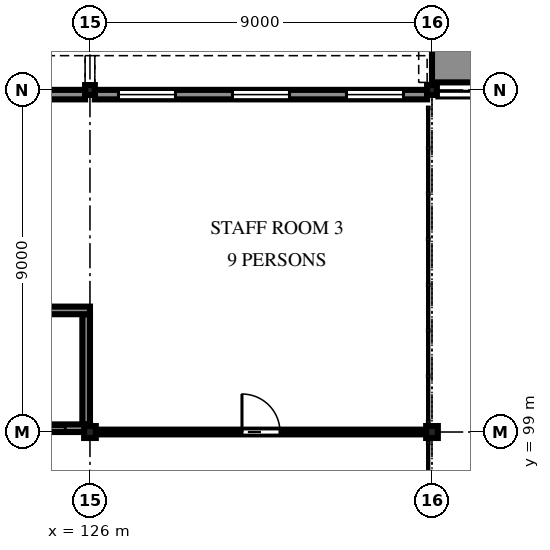
"""IFC4 building model, lengths in metres.
Left out: names, types, materials, properties, quantities, classifications, styles, units other than length and angle.
Written with IfcOpenShell. Run it as: python <this file> out.ifc"""

import sys

from ifc_helpers import new_model, si_unit, direction, frame, frame_2d, origin, origin_2d, place, context, subcontext, project, spatial, polyline, rectangle, i_section, outline, extrude, element, fill, save


model = new_model("IFC4")
c1 = context("Model", 3, precision=1e-05, world=origin(), true_north=direction((0.0, 1.0)))
c2 = subcontext(c1, "Body", "Model", "MODEL_VIEW")
j1 = project(units=[si_unit("LENGTHUNIT", "METRE"), si_unit("PLANEANGLEUNIT", "RADIAN")], contexts=[c1])
p1 = place(None, origin())
s1 = spatial("IfcSite", under=j1, at=p1, CompositionType="ELEMENT")
p2 = place(p1, origin())
s2 = spatial("IfcBuilding", under=s1, at=p2, CompositionType="ELEMENT")
p3 = place(p2, frame((0.0, 0.0, 7.5)))
s3 = spatial("IfcBuildingStorey", under=s2, at=p3, CompositionType="ELEMENT", Elevation=7.5)
p4 = place(p3, frame((126.0, 99.0, 0.0), z_axis=(0.0, 0.0, 1.0), x_axis=(1.0, 0.0, 0.0)))
e1 = element("IfcColumn", 1, at=p4, inside=s3, PredefinedType="COLUMN", context=c2, shape_type="SweptSolid", body=[
    extrude(i_section(OverallWidth=0.307, OverallDepth=0.314, WebThickness=0.012, FlangeThickness=0.019, FilletRadius=0.015, at=origin_2d()), origin(), (0.0, 0.0, 1.0), 4.2),
])
p5 = place(p3, frame((126.0, 108.0, 0.0), z_axis=(0.0, 0.0, 1.0), x_axis=(1.0, 0.0, 0.0)))
e2 = element("IfcColumn", 2, at=p5, inside=s3, PredefinedType="COLUMN", context=c2, shape_type="SweptSolid", body=[
    extrude(i_section(OverallWidth=0.256, OverallDepth=0.26, WebThickness=0.01, FlangeThickness=0.017, FilletRadius=0.013, at=origin_2d()), origin(), (0.0, 0.0, 1.0), 4.2),
])
p6 = place(p3, frame((135.0, 99.0, 0.0), z_axis=(0.0, 0.0, 1.0), x_axis=(1.0, 0.0, 0.0)))
e3 = element("IfcColumn", 3, at=p6, inside=s3, PredefinedType="COLUMN", context=c2, shape_type="SweptSolid", body=[
    extrude(i_section(OverallWidth=0.307, OverallDepth=0.314, WebThickness=0.012, FlangeThickness=0.019, FilletRadius=0.015, at=origin_2d()), origin(), (0.0, 0.0, 1.0), 4.2),
])
p7 = place(p3, frame((135.0, 108.0, 0.0), z_axis=(0.0, 0.0, 1.0), x_axis=(1.0, 0.0, 0.0)))
e4 = element("IfcColumn", 4, at=p7, inside=s3, PredefinedType="COLUMN", context=c2, shape_type="SweptSolid", body=[
    extrude(i_section(OverallWidth=0.256, OverallDepth=0.26, WebThickness=0.01, FlangeThickness=0.017, FilletRadius=0.013, at=origin_2d()), origin(), (0.0, 0.0, 1.0), 4.2),
])
p8 = place(p3, frame((117.128, 107.878, 0.0), z_axis=(0.0, 0.0, 1.0), x_axis=(1.0, 0.0, 0.0)))
e5 = element("IfcWall", 5, at=p8, inside=s3, PredefinedType="SOLIDWALL", context=c2, shape_type="SweptSolid", body=[
    extrude(rectangle(XDim=8.744, YDim=0.25, at=frame_2d((4.372, 0.0))), origin(), (0.0, 0.0, 1.0), 4.05),
])
p9 = place(p8, frame((3.922, 0.0, 1.2)))
e6 = element("IfcOpeningElement", 6, at=p9, cuts=e5, PredefinedType="OPENING", context=c2, shape_type="SweptSolid", body=[
    extrude(rectangle(XDim=0.9, YDim=1.8, at=frame_2d((0.45, 0.9))), frame((0.0, 0.135, 0.0), z_axis=(0.0, -1.0, 0.0), x_axis=(1.0, 0.0, 0.0)), (0.0, 0.0, 1.0), 0.27),
])
p10 = place(p3, frame((126.128, 107.878, 0.0), z_axis=(0.0, 0.0, 1.0), x_axis=(1.0, 0.0, 0.0)))
e7 = element("IfcWall", 7, at=p10, inside=s3, PredefinedType="SOLIDWALL", context=c2, shape_type="SweptSolid", body=[
    extrude(rectangle(XDim=8.744, YDim=0.25, at=frame_2d((4.372, 0.0))), origin(), (0.0, 0.0, 1.0), 4.05),
])
p11 = place(p10, frame((0.622, 0.0, 0.9)))
e8 = element("IfcOpeningElement", 8, at=p11, cuts=e7, PredefinedType="OPENING", context=c2, shape_type="SweptSolid", body=[
    extrude(rectangle(XDim=1.5, YDim=2.4, at=frame_2d((0.75, 1.2))), frame((0.0, 0.135, 0.0), z_axis=(0.0, -1.0, 0.0), x_axis=(1.0, 0.0, 0.0)), (0.0, 0.0, 1.0), 0.27),
])
p12 = place(p10, frame((3.622, 0.0, 0.9)))
e9 = element("IfcOpeningElement", 9, at=p12, cuts=e7, PredefinedType="OPENING", context=c2, shape_type="SweptSolid", body=[
    extrude(rectangle(XDim=1.5, YDim=2.4, at=frame_2d((0.75, 1.2))), frame((0.0, 0.135, 0.0), z_axis=(0.0, -1.0, 0.0), x_axis=(1.0, 0.0, 0.0)), (0.0, 0.0, 1.0), 0.27),
])
p13 = place(p10, frame((6.622, 0.0, 0.9)))
e10 = element("IfcOpeningElement", 10, at=p13, cuts=e7, PredefinedType="OPENING", context=c2, shape_type="SweptSolid", body=[
    extrude(rectangle(XDim=1.5, YDim=2.4, at=frame_2d((0.75, 1.2))), frame((0.0, 0.135, 0.0), z_axis=(0.0, -1.0, 0.0), x_axis=(1.0, 0.0, 0.0)), (0.0, 0.0, 1.0), 0.27),
])
p14 = place(p2, origin())
s4 = spatial("IfcBuildingStorey", under=s2, at=p14, CompositionType="ELEMENT", Elevation=0.0)
p15 = place(p14, frame((135.0, 108.7, -2.1), z_axis=(0.0, 0.0, 1.0), x_axis=(1.0, 0.0, 0.0)))
e11 = element("IfcWall", 11, at=p15, inside=s4, PredefinedType="SOLIDWALL", context=c2, shape_type="SweptSolid", body=[
    extrude(rectangle(XDim=3.0, YDim=1.0, at=frame_2d((1.5, 0.0))), origin(), (0.0, 0.0, 1.0), 26.1),
])
p16 = place(p3, frame((123.602, 99.1, 0.0), z_axis=(0.0, 0.0, 1.0), x_axis=(1.0, 0.0, 0.0)))
e12 = element("IfcWall", 12, at=p16, inside=s3, PredefinedType="SOLIDWALL", context=c2, shape_type="SweptSolid", body=[
    extrude(rectangle(XDim=2.398, YDim=0.2, at=frame_2d((1.199, 0.0))), origin(), (0.0, 0.0, 1.0), 3.516),
])
p17 = place(p16, frame((0.648, 0.0, 0.0)))
e13 = element("IfcOpeningElement", 13, at=p17, cuts=e12, PredefinedType="OPENING", context=c2, shape_type="SweptSolid", body=[
    extrude(rectangle(XDim=1.1, YDim=2.1, at=frame_2d((0.55, 1.05))), frame((0.0, 0.11, 0.0), z_axis=(0.0, -1.0, 0.0), x_axis=(1.0, 0.0, 0.0)), (0.0, 0.0, 1.0), 0.22),
])
p18 = place(p3, frame((123.602, 102.2, 0.0), z_axis=(0.0, 0.0, 1.0), x_axis=(1.0, 0.0, 0.0)))
e14 = element("IfcWall", 14, at=p18, inside=s3, PredefinedType="SOLIDWALL", context=c2, shape_type="SweptSolid", body=[
    extrude(rectangle(XDim=2.398, YDim=0.2, at=frame_2d((1.199, 0.0))), origin(), (0.0, 0.0, 1.0), 3.516),
])
p19 = place(p3, frame((125.9, 99.2, 0.0), z_axis=(0.0, 0.0, 1.0), x_axis=(0.0, 1.0, 0.0)))
e15 = element("IfcWall", 15, at=p19, inside=s3, PredefinedType="SOLIDWALL", context=c2, shape_type="SweptSolid", body=[
    extrude(rectangle(XDim=2.9, YDim=0.2, at=frame_2d((1.45, 0.0))), origin(), (0.0, 0.0, 1.0), 3.516),
])
p20 = place(p3, frame((126.154, 99.0, 0.0), z_axis=(0.0, 0.0, 1.0), x_axis=(1.0, 0.0, 0.0)))
e16 = element("IfcWall", 16, at=p20, inside=s3, PredefinedType="PARTITIONING", context=c2, shape_type="SweptSolid", body=[
    extrude(rectangle(XDim=8.692, YDim=0.125, at=frame_2d((4.346, 0.0))), origin(), (0.0, 0.0, 1.0), 3.307),
])
p21 = place(p20, frame((3.846, 0.0, 0.0)))
e17 = element("IfcOpeningElement", 17, at=p21, cuts=e16, PredefinedType="OPENING", context=c2, shape_type="SweptSolid", body=[
    extrude(rectangle(XDim=1.0, YDim=2.1, at=frame_2d((0.5, 1.05))), frame((0.0, 0.073, 0.0), z_axis=(0.0, -1.0, 0.0), x_axis=(1.0, 0.0, 0.0)), (0.0, 0.0, 1.0), 0.145),
])
p22 = place(p11, origin())
e18 = element("IfcWindow", 18, at=p22, inside=s3, PartitioningType="DOUBLE_PANEL_VERTICAL", PredefinedType="WINDOW", context=c2, shape_type="SweptSolid", body=[
    extrude(outline(polyline([(0.0, 0.0), (1.5, 0.0), (1.5, 2.4), (0.0, 2.4), (0.0, 0.0)]), holes=[polyline([(0.07, 0.07), (1.43, 0.07), (1.43, 2.33), (0.07, 2.33), (0.07, 0.07)])]), frame((0.0, 0.03, 0.0), z_axis=(0.0, -1.0, 0.0), x_axis=(1.0, 0.0, 0.0)), (0.0, 0.0, 1.0), 0.06),
    extrude(rectangle(XDim=0.04, YDim=2.26, at=frame_2d((0.75, 1.2))), frame((0.0, 0.022, 0.0), z_axis=(0.0, -1.0, 0.0), x_axis=(1.0, 0.0, 0.0)), (0.0, 0.0, 1.0), 0.044),
    extrude(outline(polyline([(0.07, 0.07), (0.73, 0.07), (0.73, 2.33), (0.07, 2.33), (0.07, 0.07)]), holes=[polyline([(0.1, 0.1), (0.7, 0.1), (0.7, 2.3), (0.1, 2.3), (0.1, 0.1)])]), frame((0.0, 0.022, 0.0), z_axis=(0.0, -1.0, 0.0), x_axis=(1.0, 0.0, 0.0)), (0.0, 0.0, 1.0), 0.045),
    extrude(rectangle(XDim=0.6, YDim=2.2, at=frame_2d((0.4, 1.2))), frame((0.0, 0.006, 0.0), z_axis=(0.0, -1.0, 0.0), x_axis=(1.0, 0.0, 0.0)), (0.0, 0.0, 1.0), 0.012),
    extrude(outline(polyline([(0.77, 0.07), (1.43, 0.07), (1.43, 2.33), (0.77, 2.33), (0.77, 0.07)]), holes=[polyline([(0.8, 0.1), (1.4, 0.1), (1.4, 2.3), (0.8, 2.3), (0.8, 0.1)])]), frame((0.0, 0.022, 0.0), z_axis=(0.0, -1.0, 0.0), x_axis=(1.0, 0.0, 0.0)), (0.0, 0.0, 1.0), 0.045),
    extrude(rectangle(XDim=0.6, YDim=2.2, at=frame_2d((1.1, 1.2))), frame((0.0, 0.006, 0.0), z_axis=(0.0, -1.0, 0.0), x_axis=(1.0, 0.0, 0.0)), (0.0, 0.0, 1.0), 0.012),
])
fill(e8, e18)
p23 = place(p12, origin())
e19 = element("IfcWindow", 19, at=p23, inside=s3, PartitioningType="DOUBLE_PANEL_VERTICAL", PredefinedType="WINDOW", context=c2, shape_type="SweptSolid", body=[
    extrude(outline(polyline([(0.0, 0.0), (1.5, 0.0), (1.5, 2.4), (0.0, 2.4), (0.0, 0.0)]), holes=[polyline([(0.07, 0.07), (1.43, 0.07), (1.43, 2.33), (0.07, 2.33), (0.07, 0.07)])]), frame((0.0, 0.03, 0.0), z_axis=(0.0, -1.0, 0.0), x_axis=(1.0, 0.0, 0.0)), (0.0, 0.0, 1.0), 0.06),
    extrude(rectangle(XDim=0.04, YDim=2.26, at=frame_2d((0.75, 1.2))), frame((0.0, 0.022, 0.0), z_axis=(0.0, -1.0, 0.0), x_axis=(1.0, 0.0, 0.0)), (0.0, 0.0, 1.0), 0.044),
    extrude(outline(polyline([(0.07, 0.07), (0.73, 0.07), (0.73, 2.33), (0.07, 2.33), (0.07, 0.07)]), holes=[polyline([(0.1, 0.1), (0.7, 0.1), (0.7, 2.3), (0.1, 2.3), (0.1, 0.1)])]), frame((0.0, 0.022, 0.0), z_axis=(0.0, -1.0, 0.0), x_axis=(1.0, 0.0, 0.0)), (0.0, 0.0, 1.0), 0.045),
    extrude(rectangle(XDim=0.6, YDim=2.2, at=frame_2d((0.4, 1.2))), frame((0.0, 0.006, 0.0), z_axis=(0.0, -1.0, 0.0), x_axis=(1.0, 0.0, 0.0)), (0.0, 0.0, 1.0), 0.012),
    extrude(outline(polyline([(0.77, 0.07), (1.43, 0.07), (1.43, 2.33), (0.77, 2.33), (0.77, 0.07)]), holes=[polyline([(0.8, 0.1), (1.4, 0.1), (1.4, 2.3), (0.8, 2.3), (0.8, 0.1)])]), frame((0.0, 0.022, 0.0), z_axis=(0.0, -1.0, 0.0), x_axis=(1.0, 0.0, 0.0)), (0.0, 0.0, 1.0), 0.045),
    extrude(rectangle(XDim=0.6, YDim=2.2, at=frame_2d((1.1, 1.2))), frame((0.0, 0.006, 0.0), z_axis=(0.0, -1.0, 0.0), x_axis=(1.0, 0.0, 0.0)), (0.0, 0.0, 1.0), 0.012),
])
fill(e9, e19)
p24 = place(p13, origin())
e20 = element("IfcWindow", 20, at=p24, inside=s3, PartitioningType="DOUBLE_PANEL_VERTICAL", PredefinedType="WINDOW", context=c2, shape_type="SweptSolid", body=[
    extrude(outline(polyline([(0.0, 0.0), (1.5, 0.0), (1.5, 2.4), (0.0, 2.4), (0.0, 0.0)]), holes=[polyline([(0.07, 0.07), (1.43, 0.07), (1.43, 2.33), (0.07, 2.33), (0.07, 0.07)])]), frame((0.0, 0.03, 0.0), z_axis=(0.0, -1.0, 0.0), x_axis=(1.0, 0.0, 0.0)), (0.0, 0.0, 1.0), 0.06),
    extrude(rectangle(XDim=0.04, YDim=2.26, at=frame_2d((0.75, 1.2))), frame((0.0, 0.022, 0.0), z_axis=(0.0, -1.0, 0.0), x_axis=(1.0, 0.0, 0.0)), (0.0, 0.0, 1.0), 0.044),
    extrude(outline(polyline([(0.07, 0.07), (0.73, 0.07), (0.73, 2.33), (0.07, 2.33), (0.07, 0.07)]), holes=[polyline([(0.1, 0.1), (0.7, 0.1), (0.7, 2.3), (0.1, 2.3), (0.1, 0.1)])]), frame((0.0, 0.022, 0.0), z_axis=(0.0, -1.0, 0.0), x_axis=(1.0, 0.0, 0.0)), (0.0, 0.0, 1.0), 0.045),
    extrude(rectangle(XDim=0.6, YDim=2.2, at=frame_2d((0.4, 1.2))), frame((0.0, 0.006, 0.0), z_axis=(0.0, -1.0, 0.0), x_axis=(1.0, 0.0, 0.0)), (0.0, 0.0, 1.0), 0.012),
    extrude(outline(polyline([(0.77, 0.07), (1.43, 0.07), (1.43, 2.33), (0.77, 2.33), (0.77, 0.07)]), holes=[polyline([(0.8, 0.1), (1.4, 0.1), (1.4, 2.3), (0.8, 2.3), (0.8, 0.1)])]), frame((0.0, 0.022, 0.0), z_axis=(0.0, -1.0, 0.0), x_axis=(1.0, 0.0, 0.0)), (0.0, 0.0, 1.0), 0.045),
    extrude(rectangle(XDim=0.6, YDim=2.2, at=frame_2d((1.1, 1.2))), frame((0.0, 0.006, 0.0), z_axis=(0.0, -1.0, 0.0), x_axis=(1.0, 0.0, 0.0)), (0.0, 0.0, 1.0), 0.012),
])
fill(e10, e20)
p25 = place(p17, origin())
e21 = element("IfcDoor", 21, at=p25, inside=s3, OperationType="SLIDING_TO_LEFT", PredefinedType="DOOR", context=c2, shape_type="SweptSolid", body=[
    extrude(outline(polyline([(0.0, 0.0), (0.07, 0.0), (0.07, 2.03), (1.03, 2.03), (1.03, 0.0), (1.1, 0.0), (1.1, 2.1), (0.0, 2.1), (0.0, 0.0)])), frame((0.0, 0.025, 0.0), z_axis=(0.0, -1.0, 0.0), x_axis=(1.0, 0.0, 0.0)), (0.0, 0.0, 1.0), 0.05),
    extrude(rectangle(XDim=0.524, YDim=2.016, at=frame_2d((0.336, 1.018))), frame((0.0, 0.018, 0.0), z_axis=(0.0, -1.0, 0.0), x_axis=(1.0, 0.0, 0.0)), (0.0, 0.0, 1.0), 0.016),
    extrude(rectangle(XDim=0.52, YDim=2.016, at=frame_2d((0.766, 1.018))), frame((0.0, -0.002, 0.0), z_axis=(0.0, -1.0, 0.0), x_axis=(1.0, 0.0, 0.0)), (0.0, 0.0, 1.0), 0.016),
])
fill(e13, e21)
p26 = place(p21, origin())
e22 = element("IfcDoor", 22, at=p26, inside=s3, OperationType="SINGLE_SWING_LEFT", PredefinedType="DOOR", context=c2, shape_type="SweptSolid", body=[
    extrude(outline(polyline([(0.0, 0.0), (0.07, 0.0), (0.07, 2.03), (0.93, 2.03), (0.93, 0.0), (1.0, 0.0), (1.0, 2.1), (0.0, 2.1), (0.0, 0.0)])), frame((0.0, 0.025, 0.0), z_axis=(0.0, -1.0, 0.0), x_axis=(1.0, 0.0, 0.0)), (0.0, 0.0, 1.0), 0.05),
    extrude(outline(polyline([(0.074, 0.01), (0.926, 0.01), (0.926, 2.026), (0.074, 2.026), (0.074, 0.01)]), holes=[polyline([(0.194, 0.16), (0.806, 0.16), (0.806, 1.01), (0.194, 1.01), (0.194, 0.16)]), polyline([(0.35, 1.16), (0.65, 1.16), (0.65, 1.76), (0.35, 1.76), (0.35, 1.16)])]), frame((0.0, 0.017, 0.0), z_axis=(0.0, -1.0, 0.0), x_axis=(1.0, 0.0, 0.0)), (0.0, 0.0, 1.0), 0.035),
    extrude(rectangle(XDim=0.612, YDim=0.85, at=frame_2d((0.5, 0.585))), frame((0.0, 0.009, 0.0), z_axis=(0.0, -1.0, 0.0), x_axis=(1.0, 0.0, 0.0)), (0.0, 0.0, 1.0), 0.017),
    extrude(rectangle(XDim=0.3, YDim=0.6, at=frame_2d((0.5, 1.46))), frame((0.0, 0.006, 0.0), z_axis=(0.0, -1.0, 0.0), x_axis=(1.0, 0.0, 0.0)), (0.0, 0.0, 1.0), 0.012),
])
fill(e17, e22)
save(model, sys.argv[1])
